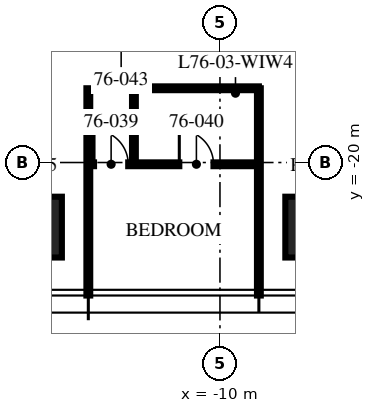
"""IFC4 building model, lengths in metres.
Left out: names, types, materials, properties, quantities, classifications, styles, units other than length and angle.
Written with IfcOpenShell. Run it as: python <this file> out.ifc"""

import sys

from ifc_helpers import new_model, si_unit, direction, frame, frame_2d, origin, origin_2d, place, context, subcontext, project, spatial, rectangle, extrude, element, fill, save


model = new_model("IFC4")
c1 = context("Model", 3, precision=1e-05, world=origin(), true_north=direction((0.0, 1.0)))
c2 = subcontext(c1, "Body", "Model", "MODEL_VIEW")
j1 = project(units=[si_unit("LENGTHUNIT", "METRE"), si_unit("PLANEANGLEUNIT", "RADIAN")], contexts=[c1])
p1 = place(None, origin())
s1 = spatial("IfcSite", under=j1, at=p1, CompositionType="ELEMENT")
p2 = place(p1, origin())
s2 = spatial("IfcBuilding", under=s1, at=p2, CompositionType="ELEMENT")
p3 = place(p2, frame((0.0, 0.0, 304.5)))
s3 = spatial("IfcBuildingStorey", under=s2, at=p3, CompositionType="ELEMENT", Elevation=304.5)
for number, where, z_axis, x_axis in (
    (1, (-7.48, -21.7, 0.0), (0.0, 0.0, 1.0), (1.0, 0.0, 0.0)),
    (2, (-14.96, -21.7, 0.0), (0.0, 0.0, 1.0), (1.0, 0.0, 0.0)),
):
    element("IfcColumn", number, at=place(p3, frame(where, z_axis=z_axis, x_axis=x_axis)), inside=s3, PredefinedType="COLUMN", context=c2, shape_type="SweptSolid", body=[
        extrude(rectangle(XDim=1.6, YDim=1.6, at=origin_2d()), origin(), (0.0, 0.0, 1.0), 3.75),
    ])
for number, where, z_axis, x_axis in (
    (3, (-13.464, -18.046, 0.0), (0.0, 0.0, 1.0), (0.0, -1.0, 0.0)),
    (4, (-8.976, -18.046, 0.0), (0.0, 0.0, 1.0), (0.0, -1.0, 0.0)),
):
    element("IfcWall", number, at=place(p3, frame(where, z_axis=z_axis, x_axis=x_axis)), inside=s3, PredefinedType="PARTITIONING", context=c2, shape_type="SweptSolid", body=[
        extrude(rectangle(XDim=5.454, YDim=0.1, at=frame_2d((2.727, 0.0))), origin(), (0.0, 0.0, 1.0), 3.01),
    ])
p4 = place(p3, frame((-13.464, -20.046, 0.0), z_axis=(0.0, 0.0, 1.0), x_axis=(1.0, 0.0, 0.0)))
e5 = element("IfcWall", 5, at=p4, inside=s3, PredefinedType="PARTITIONING", context=c2, shape_type="SweptSolid", body=[
    extrude(rectangle(XDim=4.488, YDim=0.1, at=frame_2d((2.244, 0.0))), origin(), (0.0, 0.0, 1.0), 2.91),
])
p5 = place(p4, frame((0.15, 0.0, 0.0)))
e6 = element("IfcOpeningElement", 6, at=p5, cuts=e5, PredefinedType="OPENING", context=c2, shape_type="SweptSolid", body=[
    extrude(rectangle(XDim=0.9, YDim=2.1, at=frame_2d((0.45, 1.05))), frame((0.0, 0.06, 0.0), z_axis=(0.0, -1.0, 0.0), x_axis=(1.0, 0.0, 0.0)), (0.0, 0.0, 1.0), 0.12),
])
p6 = place(p4, frame((2.394, 0.0, 0.0)))
e7 = element("IfcOpeningElement", 7, at=p6, cuts=e5, PredefinedType="OPENING", context=c2, shape_type="SweptSolid", body=[
    extrude(rectangle(XDim=0.9, YDim=2.1, at=frame_2d((0.45, 1.05))), frame((0.0, 0.06, 0.0), z_axis=(0.0, -1.0, 0.0), x_axis=(1.0, 0.0, 0.0)), (0.0, 0.0, 1.0), 0.12),
])
p7 = place(p3, frame((-12.264, -18.046, 0.0), z_axis=(0.0, 0.0, 1.0), x_axis=(0.0, -1.0, 0.0)))
e8 = element("IfcWall", 8, at=p7, inside=s3, PredefinedType="PARTITIONING", context=c2, shape_type="SweptSolid", body=[
    extrude(rectangle(XDim=2.0, YDim=0.1, at=frame_2d((1.0, 0.0))), origin(), (0.0, 0.0, 1.0), 3.5),
])
p8 = place(p3, frame((-12.264, -18.046, 0.0), z_axis=(0.0, 0.0, 1.0), x_axis=(1.0, 0.0, 0.0)))
e9 = element("IfcWall", 9, at=p8, inside=s3, PredefinedType="PARTITIONING", context=c2, shape_type="SweptSolid", body=[
    extrude(rectangle(XDim=3.288, YDim=0.1, at=frame_2d((1.644, 0.0))), origin(), (0.0, 0.0, 1.0), 2.91),
])
p9 = place(p5, origin())
e10 = element("IfcDoor", 10, at=p9, inside=s3, OperationType="SINGLE_SWING_LEFT", PredefinedType="DOOR", context=c2, shape_type="SweptSolid", body=[
    extrude(rectangle(XDim=0.9, YDim=2.1, at=frame_2d((0.45, 1.05))), frame((0.0, 0.025, 0.0), z_axis=(0.0, -1.0, 0.0), x_axis=(1.0, 0.0, 0.0)), (0.0, 0.0, 1.0), 0.05),
])
fill(e6, e10)
p10 = place(p6, origin())
e11 = element("IfcDoor", 11, at=p10, inside=s3, OperationType="SINGLE_SWING_LEFT", PredefinedType="DOOR", context=c2, shape_type="SweptSolid", body=[
    extrude(rectangle(XDim=0.9, YDim=2.1, at=frame_2d((0.45, 1.05))), frame((0.0, 0.025, 0.0), z_axis=(0.0, -1.0, 0.0), x_axis=(1.0, 0.0, 0.0)), (0.0, 0.0, 1.0), 0.05),
])
fill(e7, e11)
save(model, sys.argv[1])
